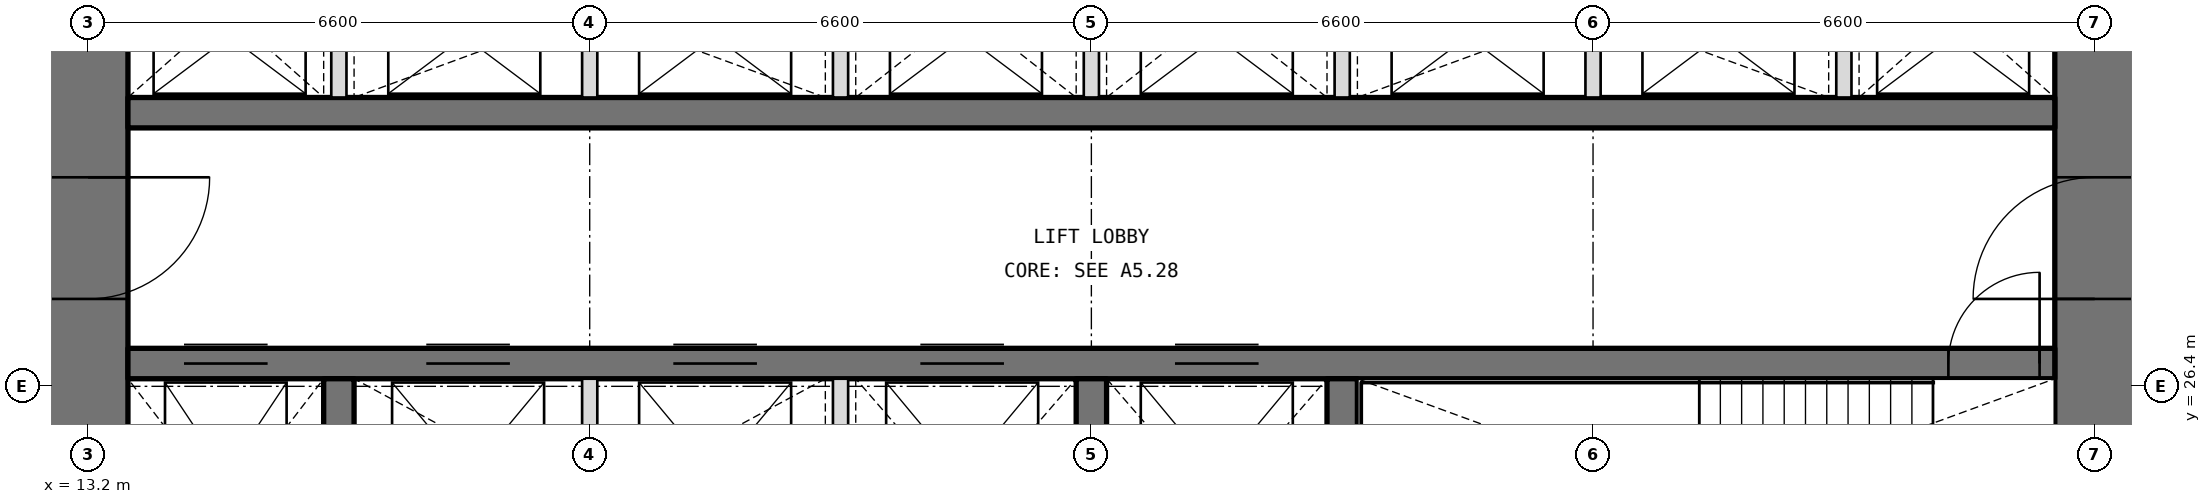
"""IFC4 building model, lengths in metres.
Left out: names, types, materials, properties, quantities, classifications, styles, units other than length and angle.
Written with IfcOpenShell. Run it as: python <this file> out.ifc"""

import sys

from ifc_helpers import new_model, si_unit, direction, frame, frame_2d, origin, place, context, subcontext, project, spatial, rectangle, extrude, element, fill, save


model = new_model("IFC4")
c1 = context("Model", 3, precision=1e-05, world=origin(), true_north=direction((0.0, 1.0)))
c2 = subcontext(c1, "Body", "Model", "MODEL_VIEW")
j1 = project(units=[si_unit("LENGTHUNIT", "METRE"), si_unit("PLANEANGLEUNIT", "RADIAN")], contexts=[c1])
p1 = place(None, origin())
s1 = spatial("IfcSite", under=j1, at=p1, CompositionType="ELEMENT")
p2 = place(p1, origin())
s2 = spatial("IfcBuilding", under=s1, at=p2, CompositionType="ELEMENT")
p3 = place(p2, frame((0.0, 0.0, 115.8)))
s3 = spatial("IfcBuildingStorey", under=s2, at=p3, CompositionType="ELEMENT", Elevation=115.8)
p4 = place(p3, frame((39.6, 13.725, 0.0), z_axis=(0.0, 0.0, 1.0), x_axis=(0.0, 1.0, 0.0)))
e1 = element("IfcWall", 1, at=p4, inside=s3, PredefinedType="SHEAR", context=c2, shape_type="SweptSolid", body=[
    extrude(rectangle(XDim=18.75, YDim=1.05, at=frame_2d((9.375, 0.0))), origin(), (0.0, 0.0, 1.0), 4.2),
])
p5 = place(p4, frame((3.025, 0.0, 0.0)))
e2 = element("IfcOpeningElement", 2, at=p5, cuts=e1, PredefinedType="OPENING", context=c2, shape_type="SweptSolid", body=[
    extrude(rectangle(XDim=1.6, YDim=2.1, at=frame_2d((0.8, 1.05))), frame((0.0, 0.535, 0.0), z_axis=(0.0, -1.0, 0.0), x_axis=(1.0, 0.0, 0.0)), (0.0, 0.0, 1.0), 1.07),
])
p6 = place(p4, frame((13.825, 0.0, 0.0)))
e3 = element("IfcOpeningElement", 3, at=p6, cuts=e1, PredefinedType="OPENING", context=c2, shape_type="SweptSolid", body=[
    extrude(rectangle(XDim=1.6, YDim=2.1, at=frame_2d((0.8, 1.05))), frame((0.0, 0.535, 0.0), z_axis=(0.0, -1.0, 0.0), x_axis=(1.0, 0.0, 0.0)), (0.0, 0.0, 1.0), 1.07),
])
p7 = place(p3, frame((13.2, 32.475, 0.0), z_axis=(0.0, 0.0, 1.0), x_axis=(0.0, -1.0, 0.0)))
e4 = element("IfcWall", 4, at=p7, inside=s3, PredefinedType="SHEAR", context=c2, shape_type="SweptSolid", body=[
    extrude(rectangle(XDim=18.75, YDim=1.05, at=frame_2d((9.375, 0.0))), origin(), (0.0, 0.0, 1.0), 4.2),
])
p8 = place(p7, frame((14.125, 0.0, 0.0)))
e5 = element("IfcOpeningElement", 5, at=p8, cuts=e4, PredefinedType="OPENING", context=c2, shape_type="SweptSolid", body=[
    extrude(rectangle(XDim=1.6, YDim=2.1, at=frame_2d((0.8, 1.05))), frame((0.0, 0.535, 0.0), z_axis=(0.0, -1.0, 0.0), x_axis=(1.0, 0.0, 0.0)), (0.0, 0.0, 1.0), 1.07),
])
p9 = place(p7, frame((3.325, 0.0, 0.0)))
e6 = element("IfcOpeningElement", 6, at=p9, cuts=e4, PredefinedType="OPENING", context=c2, shape_type="SweptSolid", body=[
    extrude(rectangle(XDim=1.6, YDim=2.1, at=frame_2d((0.8, 1.05))), frame((0.0, 0.535, 0.0), z_axis=(0.0, -1.0, 0.0), x_axis=(1.0, 0.0, 0.0)), (0.0, 0.0, 1.0), 1.07),
])
p10 = place(p3, frame((13.725, 26.7, 0.0), z_axis=(0.0, 0.0, 1.0), x_axis=(1.0, 0.0, 0.0)))
e7 = element("IfcWall", 7, at=p10, inside=s3, PredefinedType="SHEAR", context=c2, shape_type="SweptSolid", body=[
    extrude(rectangle(XDim=25.35, YDim=0.4, at=frame_2d((12.675, 0.0))), origin(), (0.0, 0.0, 1.0), 4.2),
])
p11 = place(p10, frame((23.95, 0.0, 0.0)))
e8 = element("IfcOpeningElement", 8, at=p11, cuts=e7, PredefinedType="OPENING", context=c2, shape_type="SweptSolid", body=[
    extrude(rectangle(XDim=1.2, YDim=2.1, at=frame_2d((0.6, 1.05))), frame((0.0, 0.21, 0.0), z_axis=(0.0, -1.0, 0.0), x_axis=(1.0, 0.0, 0.0)), (0.0, 0.0, 1.0), 0.42),
])
p12 = place(p10, frame((0.738, 0.0, 0.0)))
e9 = element("IfcOpeningElement", 9, at=p12, cuts=e7, PredefinedType="OPENING", context=c2, shape_type="SweptSolid", body=[
    extrude(rectangle(XDim=1.1, YDim=2.1, at=frame_2d((0.55, 1.05))), frame((0.0, 0.21, 0.0), z_axis=(0.0, -1.0, 0.0), x_axis=(1.0, 0.0, 0.0)), (0.0, 0.0, 1.0), 0.42),
])
p13 = place(p10, frame((3.925, 0.0, 0.0)))
e10 = element("IfcOpeningElement", 10, at=p13, cuts=e7, PredefinedType="OPENING", context=c2, shape_type="SweptSolid", body=[
    extrude(rectangle(XDim=1.1, YDim=2.1, at=frame_2d((0.55, 1.05))), frame((0.0, 0.21, 0.0), z_axis=(0.0, -1.0, 0.0), x_axis=(1.0, 0.0, 0.0)), (0.0, 0.0, 1.0), 0.42),
])
p14 = place(p10, frame((7.175, 0.0, 0.0)))
e11 = element("IfcOpeningElement", 11, at=p14, cuts=e7, PredefinedType="OPENING", context=c2, shape_type="SweptSolid", body=[
    extrude(rectangle(XDim=1.1, YDim=2.1, at=frame_2d((0.55, 1.05))), frame((0.0, 0.21, 0.0), z_axis=(0.0, -1.0, 0.0), x_axis=(1.0, 0.0, 0.0)), (0.0, 0.0, 1.0), 0.42),
])
p15 = place(p10, frame((10.425, 0.0, 0.0)))
e12 = element("IfcOpeningElement", 12, at=p15, cuts=e7, PredefinedType="OPENING", context=c2, shape_type="SweptSolid", body=[
    extrude(rectangle(XDim=1.1, YDim=2.1, at=frame_2d((0.55, 1.05))), frame((0.0, 0.21, 0.0), z_axis=(0.0, -1.0, 0.0), x_axis=(1.0, 0.0, 0.0)), (0.0, 0.0, 1.0), 0.42),
])
p16 = place(p10, frame((13.775, 0.0, 0.0)))
e13 = element("IfcOpeningElement", 13, at=p16, cuts=e7, PredefinedType="OPENING", context=c2, shape_type="SweptSolid", body=[
    extrude(rectangle(XDim=1.1, YDim=2.1, at=frame_2d((0.55, 1.05))), frame((0.0, 0.21, 0.0), z_axis=(0.0, -1.0, 0.0), x_axis=(1.0, 0.0, 0.0)), (0.0, 0.0, 1.0), 0.42),
])
p17 = place(p3, frame((13.725, 30.0, 0.0), z_axis=(0.0, 0.0, 1.0), x_axis=(1.0, 0.0, 0.0)))
e14 = element("IfcWall", 14, at=p17, inside=s3, PredefinedType="SHEAR", context=c2, shape_type="SweptSolid", body=[
    extrude(rectangle(XDim=25.35, YDim=0.4, at=frame_2d((12.675, 0.0))), origin(), (0.0, 0.0, 1.0), 4.2),
])
for number, where, z_axis, x_axis in (
    (15, (16.5, 23.15, 0.0), (0.0, 0.0, 1.0), (0.0, 1.0, 0.0)),
    (16, (26.4, 23.15, 0.0), (0.0, 0.0, 1.0), (0.0, 1.0, 0.0)),
    (17, (29.7, 23.15, 0.0), (0.0, 0.0, 1.0), (0.0, 1.0, 0.0)),
):
    element("IfcWall", number, at=place(p3, frame(where, z_axis=z_axis, x_axis=x_axis)), inside=s3, PredefinedType="SHEAR", context=c2, shape_type="SweptSolid", body=[
        extrude(rectangle(XDim=3.35, YDim=0.4, at=frame_2d((1.675, 0.0))), origin(), (0.0, 0.0, 1.0), 4.2),
    ])
for number, where, z_axis, x_axis in (
    (18, (16.5, 30.2, 0.0), (0.0, 0.0, 1.0), (0.0, 1.0, 0.0)),
    (19, (19.8, 30.2, 0.0), (0.0, 0.0, 1.0), (0.0, 1.0, 0.0)),
    (20, (23.1, 30.2, 0.0), (0.0, 0.0, 1.0), (0.0, 1.0, 0.0)),
    (21, (26.4, 30.2, 0.0), (0.0, 0.0, 1.0), (0.0, 1.0, 0.0)),
    (22, (29.7, 30.2, 0.0), (0.0, 0.0, 1.0), (0.0, 1.0, 0.0)),
    (23, (33.0, 30.2, 0.0), (0.0, 0.0, 1.0), (0.0, 1.0, 0.0)),
    (24, (36.3, 30.2, 0.0), (0.0, 0.0, 1.0), (0.0, 1.0, 0.0)),
):
    element("IfcWall", number, at=place(p3, frame(where, z_axis=z_axis, x_axis=x_axis)), inside=s3, PredefinedType="PARTITIONING", context=c2, shape_type="SweptSolid", body=[
        extrude(rectangle(XDim=2.275, YDim=0.2, at=frame_2d((1.138, 0.0))), origin(), (0.0, 0.0, 1.0), 4.2),
    ])
for number, where, z_axis, x_axis in (
    (25, (19.8, 23.15, 0.0), (0.0, 0.0, 1.0), (0.0, 1.0, 0.0)),
    (26, (23.1, 23.15, 0.0), (0.0, 0.0, 1.0), (0.0, 1.0, 0.0)),
):
    element("IfcWall", number, at=place(p3, frame(where, z_axis=z_axis, x_axis=x_axis)), inside=s3, PredefinedType="PARTITIONING", context=c2, shape_type="SweptSolid", body=[
        extrude(rectangle(XDim=3.35, YDim=0.2, at=frame_2d((1.675, 0.0))), origin(), (0.0, 0.0, 1.0), 4.2),
    ])
p18 = place(p11, origin())
e27 = element("IfcDoor", 27, at=p18, inside=s3, OperationType="SINGLE_SWING_RIGHT", PredefinedType="DOOR", context=c2, shape_type="SweptSolid", body=[
    extrude(rectangle(XDim=1.2, YDim=2.1, at=frame_2d((0.6, 1.05))), frame((0.0, 0.025, 0.0), z_axis=(0.0, -1.0, 0.0), x_axis=(1.0, 0.0, 0.0)), (0.0, 0.0, 1.0), 0.05),
])
fill(e8, e27)
p19 = place(p9, origin())
e28 = element("IfcDoor", 28, at=p19, inside=s3, OperationType="DOUBLE_DOOR_DOUBLE_SWING", PredefinedType="DOOR", context=c2, shape_type="SweptSolid", body=[
    extrude(rectangle(XDim=1.6, YDim=2.1, at=frame_2d((0.8, 1.05))), frame((0.0, 0.025, 0.0), z_axis=(0.0, -1.0, 0.0), x_axis=(1.0, 0.0, 0.0)), (0.0, 0.0, 1.0), 0.05),
])
fill(e6, e28)
p20 = place(p6, origin())
e29 = element("IfcDoor", 29, at=p20, inside=s3, OperationType="DOUBLE_DOOR_DOUBLE_SWING", PredefinedType="DOOR", context=c2, shape_type="SweptSolid", body=[
    extrude(rectangle(XDim=1.6, YDim=2.1, at=frame_2d((0.8, 1.05))), frame((0.0, 0.025, 0.0), z_axis=(0.0, -1.0, 0.0), x_axis=(1.0, 0.0, 0.0)), (0.0, 0.0, 1.0), 0.05),
])
fill(e3, e29)
p21 = place(p12, origin())
e30 = element("IfcDoor", 30, at=p21, inside=s3, OperationType="DOUBLE_DOOR_SLIDING", PredefinedType="DOOR", context=c2, shape_type="SweptSolid", body=[
    extrude(rectangle(XDim=1.1, YDim=2.1, at=frame_2d((0.55, 1.05))), frame((0.0, 0.025, 0.0), z_axis=(0.0, -1.0, 0.0), x_axis=(1.0, 0.0, 0.0)), (0.0, 0.0, 1.0), 0.05),
])
fill(e9, e30)
p22 = place(p13, origin())
e31 = element("IfcDoor", 31, at=p22, inside=s3, OperationType="DOUBLE_DOOR_SLIDING", PredefinedType="DOOR", context=c2, shape_type="SweptSolid", body=[
    extrude(rectangle(XDim=1.1, YDim=2.1, at=frame_2d((0.55, 1.05))), frame((0.0, 0.025, 0.0), z_axis=(0.0, -1.0, 0.0), x_axis=(1.0, 0.0, 0.0)), (0.0, 0.0, 1.0), 0.05),
])
fill(e10, e31)
p23 = place(p14, origin())
e32 = element("IfcDoor", 32, at=p23, inside=s3, OperationType="DOUBLE_DOOR_SLIDING", PredefinedType="DOOR", context=c2, shape_type="SweptSolid", body=[
    extrude(rectangle(XDim=1.1, YDim=2.1, at=frame_2d((0.55, 1.05))), frame((0.0, 0.025, 0.0), z_axis=(0.0, -1.0, 0.0), x_axis=(1.0, 0.0, 0.0)), (0.0, 0.0, 1.0), 0.05),
])
fill(e11, e32)
p24 = place(p15, origin())
e33 = element("IfcDoor", 33, at=p24, inside=s3, OperationType="DOUBLE_DOOR_SLIDING", PredefinedType="DOOR", context=c2, shape_type="SweptSolid", body=[
    extrude(rectangle(XDim=1.1, YDim=2.1, at=frame_2d((0.55, 1.05))), frame((0.0, 0.025, 0.0), z_axis=(0.0, -1.0, 0.0), x_axis=(1.0, 0.0, 0.0)), (0.0, 0.0, 1.0), 0.05),
])
fill(e12, e33)
p25 = place(p16, origin())
e34 = element("IfcDoor", 34, at=p25, inside=s3, OperationType="DOUBLE_DOOR_SLIDING", PredefinedType="DOOR", context=c2, shape_type="SweptSolid", body=[
    extrude(rectangle(XDim=1.1, YDim=2.1, at=frame_2d((0.55, 1.05))), frame((0.0, 0.025, 0.0), z_axis=(0.0, -1.0, 0.0), x_axis=(1.0, 0.0, 0.0)), (0.0, 0.0, 1.0), 0.05),
])
fill(e13, e34)
save(model, sys.argv[1])
